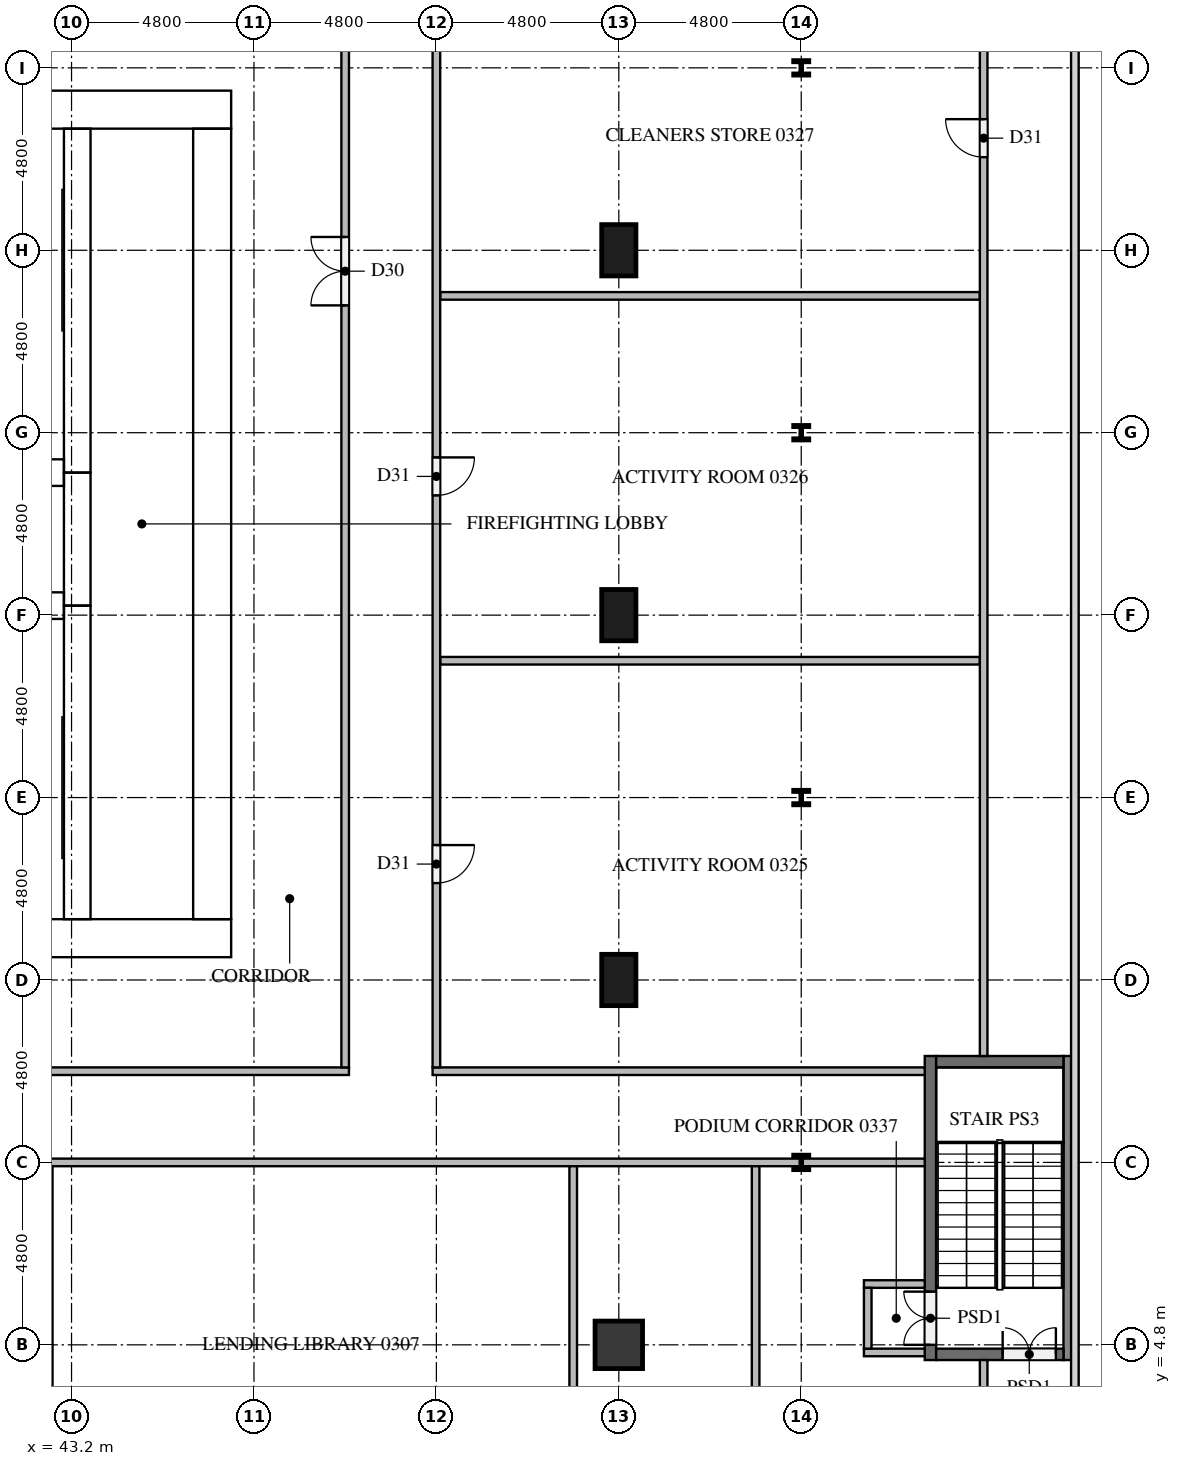
"""IFC4 building model, lengths in metres.
Left out: names, types, materials, properties, quantities, classifications, styles, units other than length and angle.
Written with IfcOpenShell. Run it as: python <this file> out.ifc"""

import sys

from ifc_helpers import new_model, si_unit, direction, frame, frame_2d, origin, origin_2d, place, context, subcontext, project, spatial, rectangle, i_section, extrude, element, fill, save


model = new_model("IFC4")
c1 = context("Model", 3, precision=1e-05, world=origin(), true_north=direction((0.0, 1.0)))
c2 = subcontext(c1, "Body", "Model", "MODEL_VIEW")
j1 = project(units=[si_unit("LENGTHUNIT", "METRE"), si_unit("PLANEANGLEUNIT", "RADIAN")], contexts=[c1])
p1 = place(None, origin())
s1 = spatial("IfcSite", under=j1, at=p1, CompositionType="ELEMENT")
p2 = place(p1, origin())
s2 = spatial("IfcBuilding", under=s1, at=p2, CompositionType="ELEMENT")
p3 = place(p2, frame((0.0, 0.0, 15.0)))
s3 = spatial("IfcBuildingStorey", under=s2, at=p3, CompositionType="ELEMENT", Elevation=15.0)
p4 = place(p3, frame((65.8, 4.4, 0.0), z_axis=(0.0, 0.0, 1.0), x_axis=(0.0, 1.0, 0.0)))
e1 = element("IfcWall", 1, at=p4, inside=s3, PredefinedType="SOLIDWALL", context=c2, shape_type="SweptSolid", body=[
    extrude(rectangle(XDim=8.0, YDim=0.3, at=frame_2d((4.0, 0.0))), origin(), (0.0, 0.0, 1.0), 4.2),
])
p5 = place(p4, frame((0.4, 0.0, 0.0)))
e2 = element("IfcOpeningElement", 2, at=p5, cuts=e1, PredefinedType="OPENING", context=c2, shape_type="SweptSolid", body=[
    extrude(rectangle(XDim=1.4, YDim=2.1, at=frame_2d((0.7, 1.05))), frame((0.0, 0.16, 0.0), z_axis=(0.0, -1.0, 0.0), x_axis=(1.0, 0.0, 0.0)), (0.0, 0.0, 1.0), 0.32),
])
p6 = place(p3, frame((69.45, 4.4, 0.0), z_axis=(0.0, 0.0, 1.0), x_axis=(0.0, 1.0, 0.0)))
e3 = element("IfcWall", 3, at=p6, inside=s3, PredefinedType="SOLIDWALL", context=c2, shape_type="SweptSolid", body=[
    extrude(rectangle(XDim=8.0, YDim=0.3, at=frame_2d((4.0, 0.0))), origin(), (0.0, 0.0, 1.0), 4.2),
])
p7 = place(p3, frame((65.95, 4.55, 0.0), z_axis=(0.0, 0.0, 1.0), x_axis=(1.0, 0.0, 0.0)))
e4 = element("IfcWall", 4, at=p7, inside=s3, PredefinedType="SOLIDWALL", context=c2, shape_type="SweptSolid", body=[
    extrude(rectangle(XDim=3.35, YDim=0.3, at=frame_2d((1.675, 0.0))), origin(), (0.0, 0.0, 1.0), 4.2),
])
p8 = place(p7, frame((1.75, 0.0, 0.0)))
e5 = element("IfcOpeningElement", 5, at=p8, cuts=e4, PredefinedType="OPENING", context=c2, shape_type="SweptSolid", body=[
    extrude(rectangle(XDim=1.4, YDim=2.1, at=frame_2d((0.7, 1.05))), frame((0.0, 0.16, 0.0), z_axis=(0.0, -1.0, 0.0), x_axis=(1.0, 0.0, 0.0)), (0.0, 0.0, 1.0), 0.32),
])
p9 = place(p3, frame((65.95, 12.25, 0.0), z_axis=(0.0, 0.0, 1.0), x_axis=(1.0, 0.0, 0.0)))
e6 = element("IfcWall", 6, at=p9, inside=s3, PredefinedType="SOLIDWALL", context=c2, shape_type="SweptSolid", body=[
    extrude(rectangle(XDim=3.35, YDim=0.3, at=frame_2d((1.675, 0.0))), origin(), (0.0, 0.0, 1.0), 4.2),
])
p10 = place(p3, frame((15.0, 15.5, 0.0), z_axis=(0.0, 0.0, 1.0), x_axis=(1.0, 0.0, 0.0)))
e7 = element("IfcWall", 7, at=p10, inside=s3, PredefinedType="SHEAR", context=c2, shape_type="SweptSolid", body=[
    extrude(rectangle(XDim=32.4, YDim=1.0, at=frame_2d((16.2, 0.0))), origin(), (0.0, 0.0, 1.0), 4.2),
])
p11 = place(p10, frame((15.3, 0.0, 0.0)))
e8 = element("IfcOpeningElement", 8, at=p11, cuts=e7, PredefinedType="OPENING", context=c2, shape_type="SweptSolid", body=[
    extrude(rectangle(XDim=1.8, YDim=2.1, at=frame_2d((0.9, 1.05))), frame((0.0, 0.51, 0.0), z_axis=(0.0, -1.0, 0.0), x_axis=(1.0, 0.0, 0.0)), (0.0, 0.0, 1.0), 1.02),
])
p12 = place(p3, frame((15.0, 37.3, 0.0), z_axis=(0.0, 0.0, 1.0), x_axis=(1.0, 0.0, 0.0)))
e9 = element("IfcWall", 9, at=p12, inside=s3, PredefinedType="SHEAR", context=c2, shape_type="SweptSolid", body=[
    extrude(rectangle(XDim=32.4, YDim=1.0, at=frame_2d((16.2, 0.0))), origin(), (0.0, 0.0, 1.0), 4.2),
])
p13 = place(p12, frame((15.3, 0.0, 0.0)))
e10 = element("IfcOpeningElement", 10, at=p13, cuts=e9, PredefinedType="OPENING", context=c2, shape_type="SweptSolid", body=[
    extrude(rectangle(XDim=1.8, YDim=2.1, at=frame_2d((0.9, 1.05))), frame((0.0, 0.51, 0.0), z_axis=(0.0, -1.0, 0.0), x_axis=(1.0, 0.0, 0.0)), (0.0, 0.0, 1.0), 1.02),
])
p14 = place(p12, frame((1.766, 0.0, 0.0)))
e11 = element("IfcOpeningElement", 11, at=p14, cuts=e9, PredefinedType="OPENING", context=c2, shape_type="SweptSolid", body=[
    extrude(rectangle(XDim=1.0, YDim=2.1, at=frame_2d((0.5, 1.05))), frame((0.0, 0.51, 0.0), z_axis=(0.0, -1.0, 0.0), x_axis=(1.0, 0.0, 0.0)), (0.0, 0.0, 1.0), 1.02),
])
p15 = place(p12, frame((5.241, 0.0, 0.0)))
e12 = element("IfcOpeningElement", 12, at=p15, cuts=e9, PredefinedType="OPENING", context=c2, shape_type="SweptSolid", body=[
    extrude(rectangle(XDim=1.0, YDim=2.1, at=frame_2d((0.5, 1.05))), frame((0.0, 0.51, 0.0), z_axis=(0.0, -1.0, 0.0), x_axis=(1.0, 0.0, 0.0)), (0.0, 0.0, 1.0), 1.02),
])
p16 = place(p3, frame((46.9, 16.0, 0.0), z_axis=(0.0, 0.0, 1.0), x_axis=(0.0, 1.0, 0.0)))
e13 = element("IfcWall", 13, at=p16, inside=s3, PredefinedType="SHEAR", context=c2, shape_type="SweptSolid", body=[
    extrude(rectangle(XDim=20.8, YDim=1.0, at=frame_2d((10.4, 0.0))), origin(), (0.0, 0.0, 1.0), 4.2),
])
p17 = place(p16, frame((10.1, 0.0, 0.0)))
e14 = element("IfcOpeningElement", 14, at=p17, cuts=e13, PredefinedType="OPENING", context=c2, shape_type="SweptSolid", body=[
    extrude(rectangle(XDim=1.2, YDim=2.1, at=frame_2d((0.6, 1.05))), frame((0.0, 0.51, 0.0), z_axis=(0.0, -1.0, 0.0), x_axis=(1.0, 0.0, 0.0)), (0.0, 0.0, 1.0), 1.02),
])
p18 = place(p3, frame((43.35, 16.0, 0.0), z_axis=(0.0, 0.0, 1.0), x_axis=(0.0, 1.0, 0.0)))
e15 = element("IfcWall", 15, at=p18, inside=s3, PredefinedType="SHEAR", context=c2, shape_type="SweptSolid", body=[
    extrude(rectangle(XDim=8.25, YDim=0.7, at=frame_2d((4.125, 0.0))), origin(), (0.0, 0.0, 1.0), 4.2),
])
p19 = place(p18, frame((0.2, 0.0, 0.0)))
e16 = element("IfcOpeningElement", 16, at=p19, cuts=e15, PredefinedType="OPENING", context=c2, shape_type="SweptSolid", body=[
    extrude(rectangle(XDim=1.2, YDim=2.1, at=frame_2d((0.6, 1.05))), frame((0.0, 0.36, 0.0), z_axis=(0.0, -1.0, 0.0), x_axis=(1.0, 0.0, 0.0)), (0.0, 0.0, 1.0), 0.72),
])
p20 = place(p3, frame((43.35, 24.25, 0.0), z_axis=(0.0, 0.0, 1.0), x_axis=(0.0, 1.0, 0.0)))
e17 = element("IfcWall", 17, at=p20, inside=s3, PredefinedType="SHEAR", context=c2, shape_type="SweptSolid", body=[
    extrude(rectangle(XDim=3.5, YDim=0.7, at=frame_2d((1.75, 0.0))), origin(), (0.0, 0.0, 1.0), 4.2),
])
p21 = place(p20, frame((1.2, 0.0, 0.0)))
e18 = element("IfcOpeningElement", 18, at=p21, cuts=e17, PredefinedType="OPENING", context=c2, shape_type="SweptSolid", body=[
    extrude(rectangle(XDim=1.1, YDim=2.1, at=frame_2d((0.55, 1.05))), frame((0.0, 0.36, 0.0), z_axis=(0.0, -1.0, 0.0), x_axis=(1.0, 0.0, 0.0)), (0.0, 0.0, 1.0), 0.72),
])
p22 = place(p3, frame((43.35, 27.75, 0.0), z_axis=(0.0, 0.0, 1.0), x_axis=(0.0, 1.0, 0.0)))
e19 = element("IfcWall", 19, at=p22, inside=s3, PredefinedType="SHEAR", context=c2, shape_type="SweptSolid", body=[
    extrude(rectangle(XDim=9.05, YDim=0.7, at=frame_2d((4.525, 0.0))), origin(), (0.0, 0.0, 1.0), 4.2),
])
p23 = place(p22, frame((7.65, 0.0, 0.0)))
e20 = element("IfcOpeningElement", 20, at=p23, cuts=e19, PredefinedType="OPENING", context=c2, shape_type="SweptSolid", body=[
    extrude(rectangle(XDim=1.2, YDim=2.1, at=frame_2d((0.6, 1.05))), frame((0.0, 0.36, 0.0), z_axis=(0.0, -1.0, 0.0), x_axis=(1.0, 0.0, 0.0)), (0.0, 0.0, 1.0), 0.72),
])
for number, where, z_axis, x_axis in (
    (21, (39.65, 24.25, 0.0), (0.0, 0.0, 1.0), (1.0, 0.0, 0.0)),
    (22, (39.65, 27.75, 0.0), (0.0, 0.0, 1.0), (1.0, 0.0, 0.0)),
):
    element("IfcWall", number, at=place(p3, frame(where, z_axis=z_axis, x_axis=x_axis)), inside=s3, PredefinedType="SHEAR", context=c2, shape_type="SweptSolid", body=[
        extrude(rectangle(XDim=3.35, YDim=0.7, at=frame_2d((1.675, 0.0))), origin(), (0.0, 0.0, 1.0), 4.2),
    ])
p24 = place(p3, frame((57.6, 4.8, 0.0), z_axis=(0.0, 0.0, 1.0), x_axis=(1.0, 0.0, 0.0)))
e23 = element("IfcColumn", 23, at=p24, inside=s3, PredefinedType="COLUMN", context=c2, shape_type="SweptSolid", body=[
    extrude(rectangle(XDim=1.25, YDim=1.25, at=origin_2d()), origin(), (0.0, 0.0, 1.0), 4.2),
])
for number, where, z_axis, x_axis in (
    (24, (57.6, 14.4, 0.0), (0.0, 0.0, 1.0), (0.0, 1.0, 0.0)),
    (25, (57.6, 24.0, 0.0), (0.0, 0.0, 1.0), (0.0, 1.0, 0.0)),
    (26, (57.6, 33.6, 0.0), (0.0, 0.0, 1.0), (0.0, 1.0, 0.0)),
):
    element("IfcColumn", number, at=place(p3, frame(where, z_axis=z_axis, x_axis=x_axis)), inside=s3, PredefinedType="COLUMN", context=c2, shape_type="SweptSolid", body=[
        extrude(rectangle(XDim=1.35, YDim=0.9, at=origin_2d()), origin(), (0.0, 0.0, 1.0), 4.2),
    ])
for number, where, z_axis, x_axis in (
    (27, (62.4, 9.6, 0.0), (0.0, 0.0, 1.0), (1.0, 0.0, 0.0)),
    (28, (62.4, 19.2, 0.0), (0.0, 0.0, 1.0), (1.0, 0.0, 0.0)),
    (29, (62.4, 28.8, 0.0), (0.0, 0.0, 1.0), (1.0, 0.0, 0.0)),
    (30, (62.4, 38.4, 0.0), (0.0, 0.0, 1.0), (1.0, 0.0, 0.0)),
):
    element("IfcColumn", number, at=place(p3, frame(where, z_axis=z_axis, x_axis=x_axis)), inside=s3, PredefinedType="COLUMN", context=c2, shape_type="SweptSolid", body=[
        extrude(i_section(OverallWidth=0.396, OverallDepth=0.381, WebThickness=0.019, FlangeThickness=0.03, at=origin_2d()), origin(), (0.0, 0.0, 1.0), 4.2),
    ])
for number, where, z_axis, x_axis in (
    (31, (64.05, 4.6, 0.0), (0.0, 0.0, 1.0), (1.0, 0.0, 0.0)),
    (32, (64.05, 6.4, 0.0), (0.0, 0.0, 1.0), (1.0, 0.0, 0.0)),
):
    element("IfcWall", number, at=place(p3, frame(where, z_axis=z_axis, x_axis=x_axis)), inside=s3, PredefinedType="PARTITIONING", context=c2, shape_type="SweptSolid", body=[
        extrude(rectangle(XDim=1.6, YDim=0.2, at=frame_2d((0.8, 0.0))), origin(), (0.0, 0.0, 1.0), 4.2),
    ])
p25 = place(p3, frame((65.65, 9.6, 0.0), z_axis=(0.0, 0.0, 1.0), x_axis=(-1.0, 0.0, 0.0)))
e33 = element("IfcWall", 33, at=p25, inside=s3, PredefinedType="PARTITIONING", context=c2, shape_type="SweptSolid", body=[
    extrude(rectangle(XDim=32.75, YDim=0.2, at=frame_2d((16.375, 0.0))), origin(), (0.0, 0.0, 1.0), 4.2),
])
p26 = place(p25, frame((27.4, 0.0, 0.0)))
e34 = element("IfcOpeningElement", 34, at=p26, cuts=e33, PredefinedType="OPENING", context=c2, shape_type="SweptSolid", body=[
    extrude(rectangle(XDim=1.0, YDim=2.1, at=frame_2d((0.5, 1.05))), frame((0.0, 0.11, 0.0), z_axis=(0.0, -1.0, 0.0), x_axis=(1.0, 0.0, 0.0)), (0.0, 0.0, 1.0), 0.22),
])
p27 = place(p3, frame((11.9, 12.0, 0.0), z_axis=(0.0, 0.0, 1.0), x_axis=(1.0, 0.0, 0.0)))
e35 = element("IfcWall", 35, at=p27, inside=s3, PredefinedType="PARTITIONING", context=c2, shape_type="SweptSolid", body=[
    extrude(rectangle(XDim=38.6, YDim=0.2, at=frame_2d((19.3, 0.0))), origin(), (0.0, 0.0, 1.0), 4.2),
])
p28 = place(p27, frame((18.45, 0.0, 0.0)))
e36 = element("IfcOpeningElement", 36, at=p28, cuts=e35, PredefinedType="OPENING", context=c2, shape_type="SweptSolid", body=[
    extrude(rectangle(XDim=1.8, YDim=2.1, at=frame_2d((0.9, 1.05))), frame((0.0, 0.11, 0.0), z_axis=(0.0, -1.0, 0.0), x_axis=(1.0, 0.0, 0.0)), (0.0, 0.0, 1.0), 0.22),
])
p29 = place(p3, frame((52.7, 12.0, 0.0), z_axis=(0.0, 0.0, 1.0), x_axis=(1.0, 0.0, 0.0)))
e37 = element("IfcWall", 37, at=p29, inside=s3, PredefinedType="PARTITIONING", context=c2, shape_type="SweptSolid", body=[
    extrude(rectangle(XDim=12.95, YDim=0.2, at=frame_2d((6.475, 0.0))), origin(), (0.0, 0.0, 1.0), 4.2),
])
for number, where, z_axis, x_axis in (
    (38, (52.9, 22.8, 0.0), (0.0, 0.0, 1.0), (1.0, 0.0, 0.0)),
    (39, (52.9, 32.4, 0.0), (0.0, 0.0, 1.0), (1.0, 0.0, 0.0)),
):
    element("IfcWall", number, at=place(p3, frame(where, z_axis=z_axis, x_axis=x_axis)), inside=s3, PredefinedType="PARTITIONING", context=c2, shape_type="SweptSolid", body=[
        extrude(rectangle(XDim=14.2, YDim=0.2, at=frame_2d((7.1, 0.0))), origin(), (0.0, 0.0, 1.0), 4.2),
    ])
p30 = place(p3, frame((42.6, 0.1, 0.0), z_axis=(0.0, 0.0, 1.0), x_axis=(0.0, 1.0, 0.0)))
e40 = element("IfcWall", 40, at=p30, inside=s3, PredefinedType="PARTITIONING", context=c2, shape_type="SweptSolid", body=[
    extrude(rectangle(XDim=9.4, YDim=0.2, at=frame_2d((4.7, 0.0))), origin(), (0.0, 0.0, 1.0), 4.2),
])
p31 = place(p3, frame((50.4, 12.1, 0.0), z_axis=(0.0, 0.0, 1.0), x_axis=(0.0, 1.0, 0.0)))
e41 = element("IfcWall", 41, at=p31, inside=s3, PredefinedType="PARTITIONING", context=c2, shape_type="SweptSolid", body=[
    extrude(rectangle(XDim=28.6, YDim=0.2, at=frame_2d((14.3, 0.0))), origin(), (0.0, 0.0, 1.0), 4.2),
])
p32 = place(p31, frame((20.05, 0.0, 0.0)))
e42 = element("IfcOpeningElement", 42, at=p32, cuts=e41, PredefinedType="OPENING", context=c2, shape_type="SweptSolid", body=[
    extrude(rectangle(XDim=1.8, YDim=2.1, at=frame_2d((0.9, 1.05))), frame((0.0, 0.11, 0.0), z_axis=(0.0, -1.0, 0.0), x_axis=(1.0, 0.0, 0.0)), (0.0, 0.0, 1.0), 0.22),
])
p33 = place(p3, frame((52.8, 40.7, 0.0), z_axis=(0.0, 0.0, 1.0), x_axis=(0.0, -1.0, 0.0)))
e43 = element("IfcWall", 43, at=p33, inside=s3, PredefinedType="PARTITIONING", context=c2, shape_type="SweptSolid", body=[
    extrude(rectangle(XDim=28.6, YDim=0.2, at=frame_2d((14.3, 0.0))), origin(), (0.0, 0.0, 1.0), 4.2),
])
p34 = place(p33, frame((22.75, 0.0, 0.0)))
e44 = element("IfcOpeningElement", 44, at=p34, cuts=e43, PredefinedType="OPENING", context=c2, shape_type="SweptSolid", body=[
    extrude(rectangle(XDim=1.0, YDim=2.1, at=frame_2d((0.5, 1.05))), frame((0.0, 0.11, 0.0), z_axis=(0.0, -1.0, 0.0), x_axis=(1.0, 0.0, 0.0)), (0.0, 0.0, 1.0), 0.22),
])
p35 = place(p33, frame((12.55, 0.0, 0.0)))
e45 = element("IfcOpeningElement", 45, at=p35, cuts=e43, PredefinedType="OPENING", context=c2, shape_type="SweptSolid", body=[
    extrude(rectangle(XDim=1.0, YDim=2.1, at=frame_2d((0.5, 1.05))), frame((0.0, 0.11, 0.0), z_axis=(0.0, -1.0, 0.0), x_axis=(1.0, 0.0, 0.0)), (0.0, 0.0, 1.0), 0.22),
])
for number, where, z_axis, x_axis in (
    (46, (56.4, 0.1, 0.0), (0.0, 0.0, 1.0), (0.0, 1.0, 0.0)),
    (47, (61.2, 0.1, 0.0), (0.0, 0.0, 1.0), (0.0, 1.0, 0.0)),
):
    element("IfcWall", number, at=place(p3, frame(where, z_axis=z_axis, x_axis=x_axis)), inside=s3, PredefinedType="PARTITIONING", context=c2, shape_type="SweptSolid", body=[
        extrude(rectangle(XDim=9.4, YDim=0.2, at=frame_2d((4.7, 0.0))), origin(), (0.0, 0.0, 1.0), 4.2),
    ])
p36 = place(p3, frame((64.15, 4.7, 0.0), z_axis=(0.0, 0.0, 1.0), x_axis=(0.0, 1.0, 0.0)))
e48 = element("IfcWall", 48, at=p36, inside=s3, PredefinedType="PARTITIONING", context=c2, shape_type="SweptSolid", body=[
    extrude(rectangle(XDim=1.6, YDim=0.2, at=frame_2d((0.8, 0.0))), origin(), (0.0, 0.0, 1.0), 4.2),
])
p37 = place(p3, frame((67.2, 0.1, 0.0), z_axis=(0.0, 0.0, 1.0), x_axis=(0.0, 1.0, 0.0)))
e49 = element("IfcWall", 49, at=p37, inside=s3, PredefinedType="PARTITIONING", context=c2, shape_type="SweptSolid", body=[
    extrude(rectangle(XDim=4.3, YDim=0.2, at=frame_2d((2.15, 0.0))), origin(), (0.0, 0.0, 1.0), 4.2),
])
p38 = place(p3, frame((67.2, 12.4, 0.0), z_axis=(0.0, 0.0, 1.0), x_axis=(0.0, 1.0, 0.0)))
e50 = element("IfcWall", 50, at=p38, inside=s3, PredefinedType="PARTITIONING", context=c2, shape_type="SweptSolid", body=[
    extrude(rectangle(XDim=28.3, YDim=0.2, at=frame_2d((14.15, 0.0))), origin(), (0.0, 0.0, 1.0), 4.2),
])
p39 = place(p38, frame((23.65, 0.0, 0.0)))
e51 = element("IfcOpeningElement", 51, at=p39, cuts=e50, PredefinedType="OPENING", context=c2, shape_type="SweptSolid", body=[
    extrude(rectangle(XDim=1.0, YDim=2.1, at=frame_2d((0.5, 1.05))), frame((0.0, 0.11, 0.0), z_axis=(0.0, -1.0, 0.0), x_axis=(1.0, 0.0, 0.0)), (0.0, 0.0, 1.0), 0.22),
])
p40 = place(p21, origin())
e52 = element("IfcDoor", 52, at=p40, inside=s3, OperationType="DOUBLE_DOOR_SLIDING", PredefinedType="DOOR", context=c2, shape_type="SweptSolid", body=[
    extrude(rectangle(XDim=1.1, YDim=2.1, at=frame_2d((0.55, 1.05))), frame((0.0, 0.025, 0.0), z_axis=(0.0, -1.0, 0.0), x_axis=(1.0, 0.0, 0.0)), (0.0, 0.0, 1.0), 0.05),
])
fill(e18, e52)
p41 = place(p19, origin())
e53 = element("IfcDoor", 53, at=p41, inside=s3, OperationType="SINGLE_SWING_RIGHT", PredefinedType="DOOR", context=c2, shape_type="SweptSolid", body=[
    extrude(rectangle(XDim=1.2, YDim=2.1, at=frame_2d((0.6, 1.05))), frame((0.0, 0.025, 0.0), z_axis=(0.0, -1.0, 0.0), x_axis=(1.0, 0.0, 0.0)), (0.0, 0.0, 1.0), 0.05),
])
fill(e16, e53)
p42 = place(p23, origin())
e54 = element("IfcDoor", 54, at=p42, inside=s3, OperationType="SINGLE_SWING_LEFT", PredefinedType="DOOR", context=c2, shape_type="SweptSolid", body=[
    extrude(rectangle(XDim=1.2, YDim=2.1, at=frame_2d((0.6, 1.05))), frame((0.0, 0.025, 0.0), z_axis=(0.0, -1.0, 0.0), x_axis=(1.0, 0.0, 0.0)), (0.0, 0.0, 1.0), 0.05),
])
fill(e20, e54)
p43 = place(p17, origin())
e55 = element("IfcDoor", 55, at=p43, inside=s3, OperationType="SINGLE_SWING_LEFT", PredefinedType="DOOR", context=c2, shape_type="SweptSolid", body=[
    extrude(rectangle(XDim=1.2, YDim=2.1, at=frame_2d((0.6, 1.05))), frame((0.0, 0.025, 0.0), z_axis=(0.0, -1.0, 0.0), x_axis=(1.0, 0.0, 0.0)), (0.0, 0.0, 1.0), 0.05),
])
fill(e14, e55)
p44 = place(p5, frame((1.4, 0.0, 0.0), z_axis=(0.0, 0.0, 1.0), x_axis=(-1.0, 0.0, 0.0)))
e56 = element("IfcDoor", 56, at=p44, inside=s3, OperationType="DOUBLE_DOOR_SINGLE_SWING", PredefinedType="DOOR", context=c2, shape_type="SweptSolid", body=[
    extrude(rectangle(XDim=1.4, YDim=2.1, at=frame_2d((0.7, 1.05))), frame((0.0, 0.025, 0.0), z_axis=(0.0, -1.0, 0.0), x_axis=(1.0, 0.0, 0.0)), (0.0, 0.0, 1.0), 0.05),
])
fill(e2, e56)
p45 = place(p8, origin())
e57 = element("IfcDoor", 57, at=p45, inside=s3, OperationType="DOUBLE_DOOR_SINGLE_SWING", PredefinedType="DOOR", context=c2, shape_type="SweptSolid", body=[
    extrude(rectangle(XDim=1.4, YDim=2.1, at=frame_2d((0.7, 1.05))), frame((0.0, 0.025, 0.0), z_axis=(0.0, -1.0, 0.0), x_axis=(1.0, 0.0, 0.0)), (0.0, 0.0, 1.0), 0.05),
])
fill(e5, e57)
p46 = place(p34, origin())
e58 = element("IfcDoor", 58, at=p46, inside=s3, OperationType="SINGLE_SWING_LEFT", PredefinedType="DOOR", context=c2, shape_type="SweptSolid", body=[
    extrude(rectangle(XDim=1.0, YDim=2.1, at=frame_2d((0.5, 1.05))), frame((0.0, 0.025, 0.0), z_axis=(0.0, -1.0, 0.0), x_axis=(1.0, 0.0, 0.0)), (0.0, 0.0, 1.0), 0.05),
])
fill(e44, e58)
p47 = place(p35, origin())
e59 = element("IfcDoor", 59, at=p47, inside=s3, OperationType="SINGLE_SWING_LEFT", PredefinedType="DOOR", context=c2, shape_type="SweptSolid", body=[
    extrude(rectangle(XDim=1.0, YDim=2.1, at=frame_2d((0.5, 1.05))), frame((0.0, 0.025, 0.0), z_axis=(0.0, -1.0, 0.0), x_axis=(1.0, 0.0, 0.0)), (0.0, 0.0, 1.0), 0.05),
])
fill(e45, e59)
p48 = place(p39, origin())
e60 = element("IfcDoor", 60, at=p48, inside=s3, OperationType="SINGLE_SWING_RIGHT", PredefinedType="DOOR", context=c2, shape_type="SweptSolid", body=[
    extrude(rectangle(XDim=1.0, YDim=2.1, at=frame_2d((0.5, 1.05))), frame((0.0, 0.025, 0.0), z_axis=(0.0, -1.0, 0.0), x_axis=(1.0, 0.0, 0.0)), (0.0, 0.0, 1.0), 0.05),
])
fill(e51, e60)
p49 = place(p32, origin())
e61 = element("IfcDoor", 61, at=p49, inside=s3, OperationType="DOUBLE_DOOR_SINGLE_SWING", PredefinedType="DOOR", context=c2, shape_type="SweptSolid", body=[
    extrude(rectangle(XDim=1.8, YDim=2.1, at=frame_2d((0.9, 1.05))), frame((0.0, 0.025, 0.0), z_axis=(0.0, -1.0, 0.0), x_axis=(1.0, 0.0, 0.0)), (0.0, 0.0, 1.0), 0.05),
])
fill(e42, e61)
save(model, sys.argv[1])
